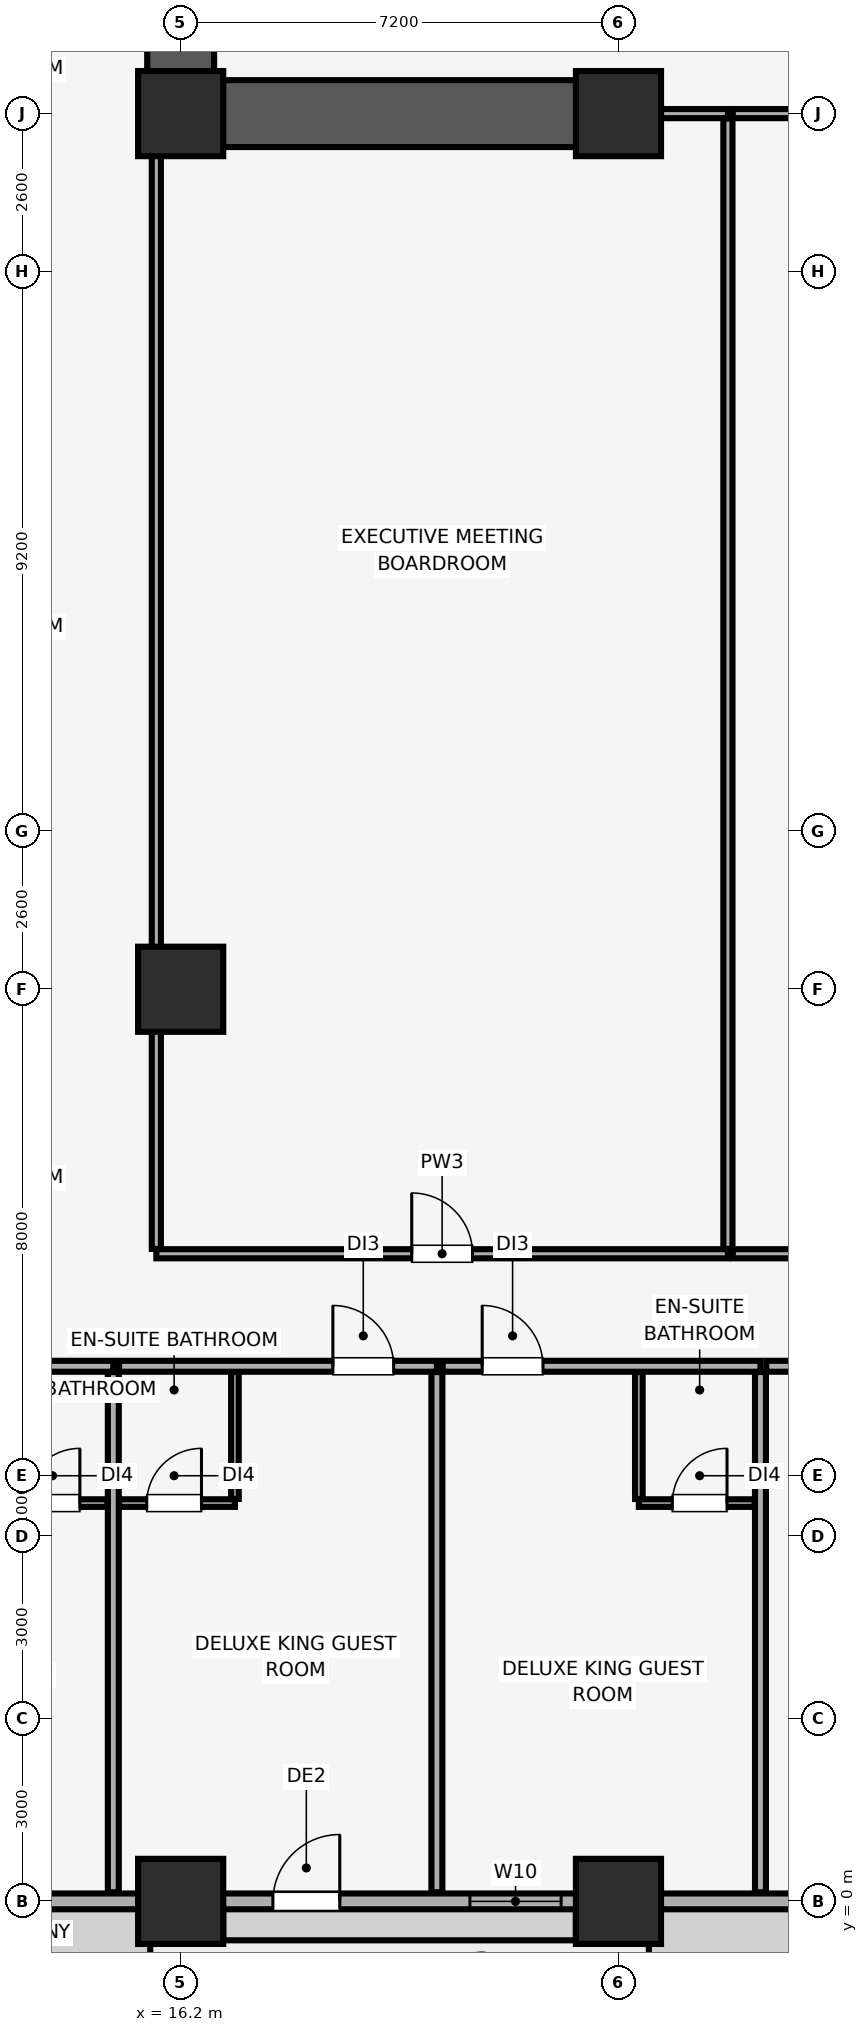
"""IFC4 building model, lengths in metres.
Left out: names, types, materials, properties, quantities, classifications, styles, units other than length and angle.
Written with IfcOpenShell. Run it as: python <this file> out.ifc"""

import sys

from ifc_helpers import new_model, si_unit, direction, frame, frame_2d, origin, origin_2d, place, context, subcontext, project, spatial, rectangle, extrude, element, fill, save


model = new_model("IFC4")
c1 = context("Model", 3, precision=1e-05, world=origin(), true_north=direction((0.0, 1.0)))
c2 = subcontext(c1, "Body", "Model", "MODEL_VIEW")
j1 = project(units=[si_unit("LENGTHUNIT", "METRE"), si_unit("PLANEANGLEUNIT", "RADIAN")], contexts=[c1])
p1 = place(None, origin())
s1 = spatial("IfcSite", under=j1, at=p1, CompositionType="ELEMENT")
p2 = place(p1, origin())
s2 = spatial("IfcBuilding", under=s1, at=p2, CompositionType="ELEMENT")
p3 = place(p2, frame((0.0, 0.0, 31.4)))
s3 = spatial("IfcBuildingStorey", under=s2, at=p3, CompositionType="ELEMENT", Elevation=31.4)
for number, where, z_axis, x_axis in (
    (1, (16.2, 0.0, 0.0), (0.0, 0.0, 1.0), (1.0, 0.0, 0.0)),
    (2, (23.4, 0.0, 0.0), (0.0, 0.0, 1.0), (1.0, 0.0, 0.0)),
    (3, (16.2, 15.0, 0.0), (0.0, 0.0, 1.0), (1.0, 0.0, 0.0)),
    (4, (16.2, 29.4, 0.0), (0.0, 0.0, 1.0), (1.0, 0.0, 0.0)),
    (5, (23.4, 29.4, 0.0), (0.0, 0.0, 1.0), (1.0, 0.0, 0.0)),
):
    element("IfcColumn", number, at=place(p3, frame(where, z_axis=z_axis, x_axis=x_axis)), inside=s3, PredefinedType="COLUMN", context=c2, shape_type="SweptSolid", body=[
        extrude(rectangle(XDim=1.4, YDim=1.4, at=origin_2d()), origin(), (0.0, 0.0, 1.0), 3.51),
    ])
p4 = place(p3, frame((4.2, 0.0, 0.0), z_axis=(0.0, 0.0, 1.0), x_axis=(1.0, 0.0, 0.0)))
e6 = element("IfcWall", 6, at=p4, inside=s3, PredefinedType="SOLIDWALL", context=c2, shape_type="SweptSolid", body=[
    extrude(rectangle(XDim=75.6, YDim=0.26, at=frame_2d((37.8, 0.0))), origin(), (0.0, 0.0, 1.0), 2.56),
])
p5 = place(p4, frame((13.517, 0.0, 0.0)))
e7 = element("IfcOpeningElement", 7, at=p5, cuts=e6, PredefinedType="OPENING", context=c2, shape_type="SweptSolid", body=[
    extrude(rectangle(XDim=1.1, YDim=2.15, at=frame_2d((0.55, 1.075))), frame((0.0, 0.14, 0.0), z_axis=(0.0, -1.0, 0.0), x_axis=(1.0, 0.0, 0.0)), (0.0, 0.0, 1.0), 0.28),
])
p6 = place(p4, frame((28.183, 0.0, 0.0)))
e8 = element("IfcOpeningElement", 8, at=p6, cuts=e6, PredefinedType="OPENING", context=c2, shape_type="SweptSolid", body=[
    extrude(rectangle(XDim=1.1, YDim=2.15, at=frame_2d((0.55, 1.075))), frame((0.0, 0.14, 0.0), z_axis=(0.0, -1.0, 0.0), x_axis=(1.0, 0.0, 0.0)), (0.0, 0.0, 1.0), 0.28),
])
p7 = place(p4, frame((60.983, 0.0, 0.0)))
e9 = element("IfcOpeningElement", 9, at=p7, cuts=e6, PredefinedType="OPENING", context=c2, shape_type="SweptSolid", body=[
    extrude(rectangle(XDim=1.1, YDim=2.15, at=frame_2d((0.55, 1.075))), frame((0.0, 0.14, 0.0), z_axis=(0.0, -1.0, 0.0), x_axis=(1.0, 0.0, 0.0)), (0.0, 0.0, 1.0), 0.28),
])
p8 = place(p4, frame((1.035, 0.0, 0.85)))
e10 = element("IfcOpeningElement", 10, at=p8, cuts=e6, PredefinedType="OPENING", context=c2, shape_type="SweptSolid", body=[
    extrude(rectangle(XDim=2.4, YDim=1.5, at=frame_2d((1.2, 0.75))), frame((0.0, 0.14, 0.0), z_axis=(0.0, -1.0, 0.0), x_axis=(1.0, 0.0, 0.0)), (0.0, 0.0, 1.0), 0.28),
])
p9 = place(p4, frame((7.031, 0.0, 0.85)))
e11 = element("IfcOpeningElement", 11, at=p9, cuts=e6, PredefinedType="OPENING", context=c2, shape_type="SweptSolid", body=[
    extrude(rectangle(XDim=2.4, YDim=1.5, at=frame_2d((1.2, 0.75))), frame((0.0, 0.14, 0.0), z_axis=(0.0, -1.0, 0.0), x_axis=(1.0, 0.0, 0.0)), (0.0, 0.0, 1.0), 0.28),
])
p10 = place(p4, frame((16.757, 0.0, 0.85)))
e12 = element("IfcOpeningElement", 12, at=p10, cuts=e6, PredefinedType="OPENING", context=c2, shape_type="SweptSolid", body=[
    extrude(rectangle(XDim=1.5, YDim=1.4, at=frame_2d((0.75, 0.7))), frame((0.0, 0.14, 0.0), z_axis=(0.0, -1.0, 0.0), x_axis=(1.0, 0.0, 0.0)), (0.0, 0.0, 1.0), 0.28),
])
p11 = place(p4, frame((22.567, 0.0, 0.85)))
e13 = element("IfcOpeningElement", 13, at=p11, cuts=e6, PredefinedType="OPENING", context=c2, shape_type="SweptSolid", body=[
    extrude(rectangle(XDim=2.4, YDim=1.5, at=frame_2d((1.2, 0.75))), frame((0.0, 0.14, 0.0), z_axis=(0.0, -1.0, 0.0), x_axis=(1.0, 0.0, 0.0)), (0.0, 0.0, 1.0), 0.28),
])
p12 = place(p4, frame((30.065, 0.0, 0.85)))
e14 = element("IfcOpeningElement", 14, at=p12, cuts=e6, PredefinedType="OPENING", context=c2, shape_type="SweptSolid", body=[
    extrude(rectangle(XDim=1.5, YDim=1.4, at=frame_2d((0.75, 0.7))), frame((0.0, 0.14, 0.0), z_axis=(0.0, -1.0, 0.0), x_axis=(1.0, 0.0, 0.0)), (0.0, 0.0, 1.0), 0.28),
])
p13 = place(p4, frame((34.55, 0.0, 0.85)))
e15 = element("IfcOpeningElement", 15, at=p13, cuts=e6, PredefinedType="OPENING", context=c2, shape_type="SweptSolid", body=[
    extrude(rectangle(XDim=2.4, YDim=1.5, at=frame_2d((1.2, 0.75))), frame((0.0, 0.14, 0.0), z_axis=(0.0, -1.0, 0.0), x_axis=(1.0, 0.0, 0.0)), (0.0, 0.0, 1.0), 0.28),
])
p14 = place(p4, frame((38.35, 0.0, 0.85)))
e16 = element("IfcOpeningElement", 16, at=p14, cuts=e6, PredefinedType="OPENING", context=c2, shape_type="SweptSolid", body=[
    extrude(rectangle(XDim=2.4, YDim=1.5, at=frame_2d((1.2, 0.75))), frame((0.0, 0.14, 0.0), z_axis=(0.0, -1.0, 0.0), x_axis=(1.0, 0.0, 0.0)), (0.0, 0.0, 1.0), 0.28),
])
p15 = place(p4, frame((44.281, 0.0, 0.85)))
e17 = element("IfcOpeningElement", 17, at=p15, cuts=e6, PredefinedType="OPENING", context=c2, shape_type="SweptSolid", body=[
    extrude(rectangle(XDim=2.4, YDim=1.5, at=frame_2d((1.2, 0.75))), frame((0.0, 0.14, 0.0), z_axis=(0.0, -1.0, 0.0), x_axis=(1.0, 0.0, 0.0)), (0.0, 0.0, 1.0), 0.28),
])
p16 = place(p4, frame((50.332, 0.0, 0.85)))
e18 = element("IfcOpeningElement", 18, at=p16, cuts=e6, PredefinedType="OPENING", context=c2, shape_type="SweptSolid", body=[
    extrude(rectangle(XDim=2.4, YDim=1.5, at=frame_2d((1.2, 0.75))), frame((0.0, 0.14, 0.0), z_axis=(0.0, -1.0, 0.0), x_axis=(1.0, 0.0, 0.0)), (0.0, 0.0, 1.0), 0.28),
])
p17 = place(p4, frame((53.981, 0.0, 0.85)))
e19 = element("IfcOpeningElement", 19, at=p17, cuts=e6, PredefinedType="OPENING", context=c2, shape_type="SweptSolid", body=[
    extrude(rectangle(XDim=1.5, YDim=1.4, at=frame_2d((0.75, 0.7))), frame((0.0, 0.14, 0.0), z_axis=(0.0, -1.0, 0.0), x_axis=(1.0, 0.0, 0.0)), (0.0, 0.0, 1.0), 0.28),
])
p18 = place(p4, frame((64.759, 0.0, 0.85)))
e20 = element("IfcOpeningElement", 20, at=p18, cuts=e6, PredefinedType="OPENING", context=c2, shape_type="SweptSolid", body=[
    extrude(rectangle(XDim=1.5, YDim=1.4, at=frame_2d((0.75, 0.7))), frame((0.0, 0.14, 0.0), z_axis=(0.0, -1.0, 0.0), x_axis=(1.0, 0.0, 0.0)), (0.0, 0.0, 1.0), 0.28),
])
p19 = place(p4, frame((67.509, 0.0, 0.85)))
e21 = element("IfcOpeningElement", 21, at=p19, cuts=e6, PredefinedType="OPENING", context=c2, shape_type="SweptSolid", body=[
    extrude(rectangle(XDim=2.4, YDim=1.5, at=frame_2d((1.2, 0.75))), frame((0.0, 0.14, 0.0), z_axis=(0.0, -1.0, 0.0), x_axis=(1.0, 0.0, 0.0)), (0.0, 0.0, 1.0), 0.28),
])
p20 = place(p4, frame((72.165, 0.0, 0.85)))
e22 = element("IfcOpeningElement", 22, at=p20, cuts=e6, PredefinedType="OPENING", context=c2, shape_type="SweptSolid", body=[
    extrude(rectangle(XDim=2.4, YDim=1.5, at=frame_2d((1.2, 0.75))), frame((0.0, 0.14, 0.0), z_axis=(0.0, -1.0, 0.0), x_axis=(1.0, 0.0, 0.0)), (0.0, 0.0, 1.0), 0.28),
])
p21 = place(p3, frame((16.2, 29.4, 0.0), z_axis=(0.0, 0.0, 1.0), x_axis=(0.0, 1.0, 0.0)))
e23 = element("IfcWall", 23, at=p21, inside=s3, PredefinedType="SHEAR", context=c2, shape_type="SweptSolid", body=[
    extrude(rectangle(XDim=19.2, YDim=1.1, at=frame_2d((9.6, 0.0))), origin(), (0.0, 0.0, 1.0), 3.51),
])
p22 = place(p3, frame((16.755, 29.4, 0.0), z_axis=(0.0, 0.0, 1.0), x_axis=(1.0, 0.0, 0.0)))
e24 = element("IfcWall", 24, at=p22, inside=s3, PredefinedType="SHEAR", context=c2, shape_type="SweptSolid", body=[
    extrude(rectangle(XDim=6.845, YDim=1.1, at=frame_2d((3.423, 0.0))), origin(), (0.0, 0.0, 1.0), 3.51),
])
p23 = place(p3, frame((9.866, 8.8, 0.0), z_axis=(0.0, 0.0, 1.0), x_axis=(1.0, 0.0, 0.0)))
e25 = element("IfcWall", 25, at=p23, inside=s3, PredefinedType="PARTITIONING", context=c2, shape_type="SweptSolid", body=[
    extrude(rectangle(XDim=5.226, YDim=0.18, at=frame_2d((2.613, 0.0))), origin(), (0.0, 0.0, 1.0), 3.51),
])
p24 = place(p23, frame((0.65, 0.0, 0.0)))
e26 = element("IfcOpeningElement", 26, at=p24, cuts=e25, PredefinedType="OPENING", context=c2, shape_type="SweptSolid", body=[
    extrude(rectangle(XDim=1.0, YDim=2.15, at=frame_2d((0.5, 1.075))), frame((0.0, 0.1, 0.0), z_axis=(0.0, -1.0, 0.0), x_axis=(1.0, 0.0, 0.0)), (0.0, 0.0, 1.0), 0.2),
])
p25 = place(p3, frame((15.093, 0.15, 0.0), z_axis=(0.0, 0.0, 1.0), x_axis=(0.0, 1.0, 0.0)))
e27 = element("IfcWall", 27, at=p25, inside=s3, PredefinedType="PARTITIONING", context=c2, shape_type="SweptSolid", body=[
    extrude(rectangle(XDim=8.555, YDim=0.18, at=frame_2d((4.278, 0.0))), origin(), (0.0, 0.0, 1.0), 3.51),
])
p26 = place(p3, frame((13.093, 6.55, 0.0), z_axis=(0.0, 0.0, 1.0), x_axis=(1.0, 0.0, 0.0)))
e28 = element("IfcWall", 28, at=p26, inside=s3, PredefinedType="PARTITIONING", context=c2, shape_type="SweptSolid", body=[
    extrude(rectangle(XDim=1.905, YDim=0.125, at=frame_2d((0.953, 0.0))), origin(), (0.0, 0.0, 1.0), 3.51),
])
p27 = place(p26, frame((0.55, 0.0, 0.0)))
e29 = element("IfcOpeningElement", 29, at=p27, cuts=e28, PredefinedType="OPENING", context=c2, shape_type="SweptSolid", body=[
    extrude(rectangle(XDim=0.9, YDim=2.1, at=frame_2d((0.45, 1.05))), frame((0.0, 0.073, 0.0), z_axis=(0.0, -1.0, 0.0), x_axis=(1.0, 0.0, 0.0)), (0.0, 0.0, 1.0), 0.145),
])
p28 = place(p3, frame((15.188, 8.8, 0.0), z_axis=(0.0, 0.0, 1.0), x_axis=(1.0, 0.0, 0.0)))
e30 = element("IfcWall", 30, at=p28, inside=s3, PredefinedType="PARTITIONING", context=c2, shape_type="SweptSolid", body=[
    extrude(rectangle(XDim=5.226, YDim=0.18, at=frame_2d((2.613, 0.0))), origin(), (0.0, 0.0, 1.0), 3.51),
])
p29 = place(p28, frame((3.516, 0.0, 0.0)))
e31 = element("IfcOpeningElement", 31, at=p29, cuts=e30, PredefinedType="OPENING", context=c2, shape_type="SweptSolid", body=[
    extrude(rectangle(XDim=1.0, YDim=2.15, at=frame_2d((0.5, 1.075))), frame((0.0, 0.1, 0.0), z_axis=(0.0, -1.0, 0.0), x_axis=(1.0, 0.0, 0.0)), (0.0, 0.0, 1.0), 0.2),
])
p30 = place(p3, frame((20.414, 0.15, 0.0), z_axis=(0.0, 0.0, 1.0), x_axis=(0.0, 1.0, 0.0)))
e32 = element("IfcWall", 32, at=p30, inside=s3, PredefinedType="PARTITIONING", context=c2, shape_type="SweptSolid", body=[
    extrude(rectangle(XDim=8.555, YDim=0.18, at=frame_2d((4.278, 0.0))), origin(), (0.0, 0.0, 1.0), 3.51),
])
p31 = place(p3, frame((15.188, 6.55, 0.0), z_axis=(0.0, 0.0, 1.0), x_axis=(1.0, 0.0, 0.0)))
e33 = element("IfcWall", 33, at=p31, inside=s3, PredefinedType="PARTITIONING", context=c2, shape_type="SweptSolid", body=[
    extrude(rectangle(XDim=1.905, YDim=0.125, at=frame_2d((0.953, 0.0))), origin(), (0.0, 0.0, 1.0), 3.51),
])
p32 = place(p31, frame((0.455, 0.0, 0.0)))
e34 = element("IfcOpeningElement", 34, at=p32, cuts=e33, PredefinedType="OPENING", context=c2, shape_type="SweptSolid", body=[
    extrude(rectangle(XDim=0.9, YDim=2.1, at=frame_2d((0.45, 1.05))), frame((0.0, 0.073, 0.0), z_axis=(0.0, -1.0, 0.0), x_axis=(1.0, 0.0, 0.0)), (0.0, 0.0, 1.0), 0.145),
])
p33 = place(p3, frame((17.093, 6.617, 0.0), z_axis=(0.0, 0.0, 1.0), x_axis=(0.0, 1.0, 0.0)))
e35 = element("IfcWall", 35, at=p33, inside=s3, PredefinedType="PARTITIONING", context=c2, shape_type="SweptSolid", body=[
    extrude(rectangle(XDim=2.088, YDim=0.125, at=frame_2d((1.044, 0.0))), origin(), (0.0, 0.0, 1.0), 3.51),
])
p34 = place(p3, frame((20.509, 8.8, 0.0), z_axis=(0.0, 0.0, 1.0), x_axis=(1.0, 0.0, 0.0)))
e36 = element("IfcWall", 36, at=p34, inside=s3, PredefinedType="PARTITIONING", context=c2, shape_type="SweptSolid", body=[
    extrude(rectangle(XDim=5.226, YDim=0.18, at=frame_2d((2.613, 0.0))), origin(), (0.0, 0.0, 1.0), 3.51),
])
p35 = place(p34, frame((0.65, 0.0, 0.0)))
e37 = element("IfcOpeningElement", 37, at=p35, cuts=e36, PredefinedType="OPENING", context=c2, shape_type="SweptSolid", body=[
    extrude(rectangle(XDim=1.0, YDim=2.15, at=frame_2d((0.5, 1.075))), frame((0.0, 0.1, 0.0), z_axis=(0.0, -1.0, 0.0), x_axis=(1.0, 0.0, 0.0)), (0.0, 0.0, 1.0), 0.2),
])
p36 = place(p3, frame((25.735, 0.15, 0.0), z_axis=(0.0, 0.0, 1.0), x_axis=(0.0, 1.0, 0.0)))
e38 = element("IfcWall", 38, at=p36, inside=s3, PredefinedType="PARTITIONING", context=c2, shape_type="SweptSolid", body=[
    extrude(rectangle(XDim=8.555, YDim=0.18, at=frame_2d((4.278, 0.0))), origin(), (0.0, 0.0, 1.0), 3.51),
])
p37 = place(p3, frame((23.735, 6.55, 0.0), z_axis=(0.0, 0.0, 1.0), x_axis=(1.0, 0.0, 0.0)))
e39 = element("IfcWall", 39, at=p37, inside=s3, PredefinedType="PARTITIONING", context=c2, shape_type="SweptSolid", body=[
    extrude(rectangle(XDim=1.905, YDim=0.125, at=frame_2d((0.952, 0.0))), origin(), (0.0, 0.0, 1.0), 3.51),
])
p38 = place(p37, frame((0.55, 0.0, 0.0)))
e40 = element("IfcOpeningElement", 40, at=p38, cuts=e39, PredefinedType="OPENING", context=c2, shape_type="SweptSolid", body=[
    extrude(rectangle(XDim=0.9, YDim=2.1, at=frame_2d((0.45, 1.05))), frame((0.0, 0.073, 0.0), z_axis=(0.0, -1.0, 0.0), x_axis=(1.0, 0.0, 0.0)), (0.0, 0.0, 1.0), 0.145),
])
p39 = place(p3, frame((23.735, 6.617, 0.0), z_axis=(0.0, 0.0, 1.0), x_axis=(0.0, 1.0, 0.0)))
e41 = element("IfcWall", 41, at=p39, inside=s3, PredefinedType="PARTITIONING", context=c2, shape_type="SweptSolid", body=[
    extrude(rectangle(XDim=2.088, YDim=0.125, at=frame_2d((1.044, 0.0))), origin(), (0.0, 0.0, 1.0), 3.51),
])
p40 = place(p3, frame((25.83, 8.8, 0.0), z_axis=(0.0, 0.0, 1.0), x_axis=(1.0, 0.0, 0.0)))
e42 = element("IfcWall", 42, at=p40, inside=s3, PredefinedType="PARTITIONING", context=c2, shape_type="SweptSolid", body=[
    extrude(rectangle(XDim=5.226, YDim=0.18, at=frame_2d((2.613, 0.0))), origin(), (0.0, 0.0, 1.0), 3.51),
])
p41 = place(p40, frame((0.65, 0.0, 0.0)))
e43 = element("IfcOpeningElement", 43, at=p41, cuts=e42, PredefinedType="OPENING", context=c2, shape_type="SweptSolid", body=[
    extrude(rectangle(XDim=1.0, YDim=2.15, at=frame_2d((0.5, 1.075))), frame((0.0, 0.1, 0.0), z_axis=(0.0, -1.0, 0.0), x_axis=(1.0, 0.0, 0.0)), (0.0, 0.0, 1.0), 0.2),
])
p42 = place(p3, frame((15.8, 10.65, 0.0), z_axis=(0.0, 0.0, 1.0), x_axis=(1.0, 0.0, 0.0)))
e44 = element("IfcWall", 44, at=p42, inside=s3, PredefinedType="PARTITIONING", context=c2, shape_type="SweptSolid", body=[
    extrude(rectangle(XDim=9.4, YDim=0.15, at=frame_2d((4.7, 0.0))), origin(), (0.0, 0.0, 1.0), 3.51),
])
p43 = place(p42, frame((4.2, 0.0, 0.0)))
e45 = element("IfcOpeningElement", 45, at=p43, cuts=e44, PredefinedType="OPENING", context=c2, shape_type="SweptSolid", body=[
    extrude(rectangle(XDim=1.0, YDim=2.15, at=frame_2d((0.5, 1.075))), frame((0.0, 0.085, 0.0), z_axis=(0.0, -1.0, 0.0), x_axis=(1.0, 0.0, 0.0)), (0.0, 0.0, 1.0), 0.17),
])
p44 = place(p3, frame((23.61, 29.4, 0.0), z_axis=(0.0, 0.0, 1.0), x_axis=(1.0, 0.0, 0.0)))
e46 = element("IfcWall", 46, at=p44, inside=s3, PredefinedType="PARTITIONING", context=c2, shape_type="SweptSolid", body=[
    extrude(rectangle(XDim=1.59, YDim=0.15, at=frame_2d((0.795, 0.0))), origin(), (0.0, 0.0, 1.0), 2.41),
])
p45 = place(p3, frame((15.8, 10.73, 0.0), z_axis=(0.0, 0.0, 1.0), x_axis=(0.0, 1.0, 0.0)))
e47 = element("IfcWall", 47, at=p45, inside=s3, PredefinedType="PARTITIONING", context=c2, shape_type="SweptSolid", body=[
    extrude(rectangle(XDim=18.66, YDim=0.15, at=frame_2d((9.33, 0.0))), origin(), (0.0, 0.0, 1.0), 3.51),
])
p46 = place(p3, frame((25.2, 10.73, 0.0), z_axis=(0.0, 0.0, 1.0), x_axis=(0.0, 1.0, 0.0)))
e48 = element("IfcWall", 48, at=p46, inside=s3, PredefinedType="PARTITIONING", context=c2, shape_type="SweptSolid", body=[
    extrude(rectangle(XDim=18.59, YDim=0.15, at=frame_2d((9.295, 0.0))), origin(), (0.0, 0.0, 1.0), 3.51),
])
p47 = place(p3, frame((25.28, 10.65, 0.0), z_axis=(0.0, 0.0, 1.0), x_axis=(1.0, 0.0, 0.0)))
e49 = element("IfcWall", 49, at=p47, inside=s3, PredefinedType="PARTITIONING", context=c2, shape_type="SweptSolid", body=[
    extrude(rectangle(XDim=14.52, YDim=0.15, at=frame_2d((7.26, 0.0))), origin(), (0.0, 0.0, 1.0), 3.51),
])
p48 = place(p47, frame((6.47, 0.0, 0.0)))
e50 = element("IfcOpeningElement", 50, at=p48, cuts=e49, PredefinedType="OPENING", context=c2, shape_type="SweptSolid", body=[
    extrude(rectangle(XDim=1.5, YDim=2.25, at=frame_2d((0.75, 1.125))), frame((0.0, 0.085, 0.0), z_axis=(0.0, -1.0, 0.0), x_axis=(1.0, 0.0, 0.0)), (0.0, 0.0, 1.0), 0.17),
])
p49 = place(p3, frame((25.28, 29.4, 0.0), z_axis=(0.0, 0.0, 1.0), x_axis=(1.0, 0.0, 0.0)))
e51 = element("IfcWall", 51, at=p49, inside=s3, PredefinedType="PARTITIONING", context=c2, shape_type="SweptSolid", body=[
    extrude(rectangle(XDim=5.11, YDim=0.15, at=frame_2d((2.555, 0.0))), origin(), (0.0, 0.0, 1.0), 2.41),
])
p50 = place(p5, origin())
e52 = element("IfcDoor", 52, at=p50, inside=s3, OperationType="SINGLE_SWING_RIGHT", PredefinedType="DOOR", context=c2, shape_type="SweptSolid", body=[
    extrude(rectangle(XDim=1.1, YDim=2.15, at=frame_2d((0.55, 1.075))), frame((0.0, 0.025, 0.0), z_axis=(0.0, -1.0, 0.0), x_axis=(1.0, 0.0, 0.0)), (0.0, 0.0, 1.0), 0.05),
])
fill(e7, e52)
p51 = place(p10, origin())
e53 = element("IfcWindow", 53, at=p51, inside=s3, PartitioningType="SINGLE_PANEL", PredefinedType="WINDOW", context=c2, shape_type="SweptSolid", body=[
    extrude(rectangle(XDim=1.5, YDim=1.4, at=frame_2d((0.75, 0.7))), frame((0.0, 0.03, 0.0), z_axis=(0.0, -1.0, 0.0), x_axis=(1.0, 0.0, 0.0)), (0.0, 0.0, 1.0), 0.06),
])
fill(e12, e53)
p52 = place(p27, origin())
e54 = element("IfcDoor", 54, at=p52, inside=s3, OperationType="SINGLE_SWING_RIGHT", PredefinedType="DOOR", context=c2, shape_type="SweptSolid", body=[
    extrude(rectangle(XDim=0.9, YDim=2.1, at=frame_2d((0.45, 1.05))), frame((0.0, 0.025, 0.0), z_axis=(0.0, -1.0, 0.0), x_axis=(1.0, 0.0, 0.0)), (0.0, 0.0, 1.0), 0.05),
])
fill(e29, e54)
p53 = place(p29, origin())
e55 = element("IfcDoor", 55, at=p53, inside=s3, OperationType="SINGLE_SWING_LEFT", PredefinedType="DOOR", context=c2, shape_type="SweptSolid", body=[
    extrude(rectangle(XDim=1.0, YDim=2.15, at=frame_2d((0.5, 1.075))), frame((0.0, 0.025, 0.0), z_axis=(0.0, -1.0, 0.0), x_axis=(1.0, 0.0, 0.0)), (0.0, 0.0, 1.0), 0.05),
])
fill(e31, e55)
p54 = place(p32, origin())
e56 = element("IfcDoor", 56, at=p54, inside=s3, OperationType="SINGLE_SWING_RIGHT", PredefinedType="DOOR", context=c2, shape_type="SweptSolid", body=[
    extrude(rectangle(XDim=0.9, YDim=2.1, at=frame_2d((0.45, 1.05))), frame((0.0, 0.025, 0.0), z_axis=(0.0, -1.0, 0.0), x_axis=(1.0, 0.0, 0.0)), (0.0, 0.0, 1.0), 0.05),
])
fill(e34, e56)
p55 = place(p35, origin())
e57 = element("IfcDoor", 57, at=p55, inside=s3, OperationType="SINGLE_SWING_LEFT", PredefinedType="DOOR", context=c2, shape_type="SweptSolid", body=[
    extrude(rectangle(XDim=1.0, YDim=2.15, at=frame_2d((0.5, 1.075))), frame((0.0, 0.025, 0.0), z_axis=(0.0, -1.0, 0.0), x_axis=(1.0, 0.0, 0.0)), (0.0, 0.0, 1.0), 0.05),
])
fill(e37, e57)
p56 = place(p38, origin())
e58 = element("IfcDoor", 58, at=p56, inside=s3, OperationType="SINGLE_SWING_RIGHT", PredefinedType="DOOR", context=c2, shape_type="SweptSolid", body=[
    extrude(rectangle(XDim=0.9, YDim=2.1, at=frame_2d((0.45, 1.05))), frame((0.0, 0.025, 0.0), z_axis=(0.0, -1.0, 0.0), x_axis=(1.0, 0.0, 0.0)), (0.0, 0.0, 1.0), 0.05),
])
fill(e40, e58)
p57 = place(p43, origin())
e59 = element("IfcDoor", 59, at=p57, inside=s3, OperationType="SINGLE_SWING_LEFT", PredefinedType="DOOR", context=c2, shape_type="SweptSolid", body=[
    extrude(rectangle(XDim=1.0, YDim=2.15, at=frame_2d((0.5, 1.075))), frame((0.0, 0.025, 0.0), z_axis=(0.0, -1.0, 0.0), x_axis=(1.0, 0.0, 0.0)), (0.0, 0.0, 1.0), 0.05),
])
fill(e45, e59)
save(model, sys.argv[1])
